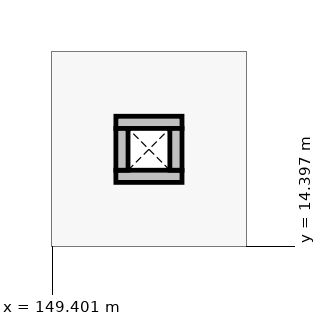
"""IFC4 building model, lengths in metres.
Left out: names, types, materials, properties, quantities, classifications, styles, units other than length and angle.
Written with IfcOpenShell. Run it as: python <this file> out.ifc"""

import sys

from ifc_helpers import new_model, si_unit, direction, frame, frame_2d, origin, place, context, subcontext, project, spatial, rectangle, extrude, element, save


model = new_model("IFC4")
c1 = context("Model", 3, precision=1e-05, world=origin(), true_north=direction((0.0, 1.0)))
c2 = subcontext(c1, "Body", "Model", "MODEL_VIEW")
j1 = project(units=[si_unit("LENGTHUNIT", "METRE"), si_unit("PLANEANGLEUNIT", "RADIAN")], contexts=[c1])
p1 = place(None, origin())
s1 = spatial("IfcSite", under=j1, at=p1, CompositionType="ELEMENT")
p2 = place(p1, origin())
s2 = spatial("IfcBuilding", under=s1, at=p2, CompositionType="ELEMENT")
p3 = place(p2, frame((0.0, 0.0, 4.8)))
s3 = spatial("IfcBuildingStorey", under=s2, at=p3, CompositionType="ELEMENT", Elevation=4.8)
for number, where, z_axis, x_axis in (
    (1, (150.24, 15.32, 0.0), (0.0, 0.0, 1.0), (1.0, 0.0, 0.0)),
    (2, (150.24, 16.03, 0.0), (0.0, 0.0, 1.0), (1.0, 0.0, 0.0)),
):
    element("IfcWall", number, at=place(p3, frame(where, z_axis=z_axis, x_axis=x_axis)), inside=s3, PredefinedType="PARTITIONING", context=c2, shape_type="SweptSolid", body=[
        extrude(rectangle(XDim=0.87, YDim=0.16, at=frame_2d((0.435, 0.0))), origin(), (0.0, 0.0, 1.0), 3.35),
    ])
for number, where, z_axis, x_axis in (
    (3, (150.32, 15.4, 0.0), (0.0, 0.0, 1.0), (0.0, 1.0, 0.0)),
    (4, (151.03, 15.4, 0.0), (0.0, 0.0, 1.0), (0.0, 1.0, 0.0)),
):
    element("IfcWall", number, at=place(p3, frame(where, z_axis=z_axis, x_axis=x_axis)), inside=s3, PredefinedType="PARTITIONING", context=c2, shape_type="SweptSolid", body=[
        extrude(rectangle(XDim=0.55, YDim=0.16, at=frame_2d((0.275, 0.0))), origin(), (0.0, 0.0, 1.0), 3.35),
    ])
save(model, sys.argv[1])
